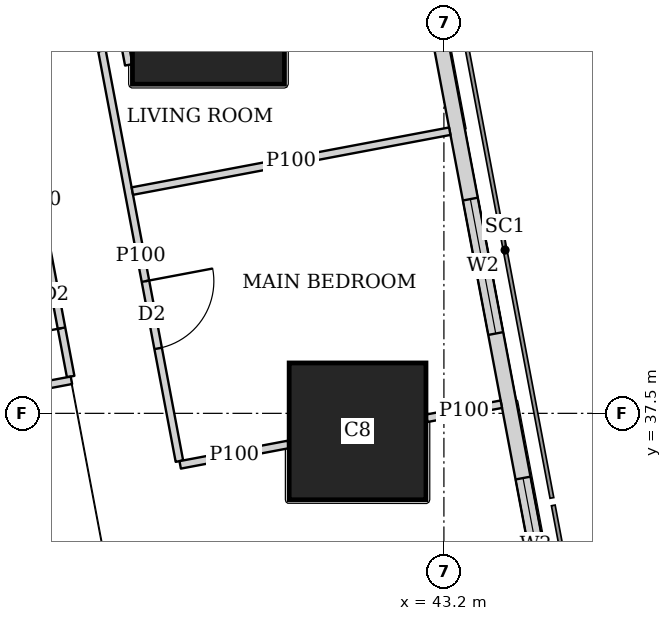
"""IFC4 building model, lengths in metres.
Left out: names, types, materials, properties, quantities, classifications, styles, units other than length and angle.
Written with IfcOpenShell. Run it as: python <this file> out.ifc"""

import sys

from ifc_helpers import new_model, si_unit, direction, frame, frame_2d, origin, origin_2d, place, context, subcontext, project, spatial, rectangle, extrude, element, fill, save


model = new_model("IFC4")
c1 = context("Model", 3, precision=1e-05, world=origin(), true_north=direction((0.0, 1.0)))
c2 = subcontext(c1, "Body", "Model", "MODEL_VIEW")
j1 = project(units=[si_unit("LENGTHUNIT", "METRE"), si_unit("PLANEANGLEUNIT", "RADIAN")], contexts=[c1])
p1 = place(None, origin())
s1 = spatial("IfcSite", under=j1, at=p1, CompositionType="ELEMENT")
p2 = place(p1, origin())
s2 = spatial("IfcBuilding", under=s1, at=p2, CompositionType="ELEMENT")
p3 = place(p2, frame((0.0, 0.0, 180.8)))
s3 = spatial("IfcBuildingStorey", under=s2, at=p3, CompositionType="ELEMENT", Elevation=180.8)
p4 = place(p3, frame((42.064, 37.263, 0.0), z_axis=(0.0, 0.0, 1.0), x_axis=(1.0, 0.0, 0.0)))
e1 = element("IfcColumn", 1, at=p4, inside=s3, PredefinedType="COLUMN", context=c2, shape_type="SweptSolid", body=[
    extrude(rectangle(XDim=1.8, YDim=1.8, at=origin_2d()), origin(), (0.0, 0.0, 1.0), 3.75),
])
p5 = place(p3, frame((40.102, 42.83, 0.0), z_axis=(0.0, 0.0, 1.0), x_axis=(1.0, 0.0, 0.0)))
e2 = element("IfcColumn", 2, at=p5, inside=s3, PredefinedType="COLUMN", context=c2, shape_type="SweptSolid", body=[
    extrude(rectangle(XDim=2.0, YDim=2.0, at=origin_2d()), origin(), (0.0, 0.0, 1.0), 3.75),
])
p6 = place(p3, frame((50.653, 2.703, 0.0), z_axis=(0.0, 0.0, 1.0), x_axis=(-0.185612026696, 0.982623109613, 0.0)))
e3 = element("IfcWall", 3, at=p6, inside=s3, PredefinedType="SOLIDWALL", context=c2, shape_type="SweptSolid", body=[
    extrude(rectangle(XDim=41.393, YDim=0.2, at=frame_2d((20.697, 0.0))), origin(), (0.0, 0.0, 1.0), 3.5),
])
p7 = place(p6, frame((1.633, 0.0, 0.9)))
e4 = element("IfcOpeningElement", 4, at=p7, cuts=e3, PredefinedType="OPENING", context=c2, shape_type="SweptSolid", body=[
    extrude(rectangle(XDim=1.8, YDim=1.5, at=frame_2d((0.9, 0.75))), frame((0.0, 0.11, 0.0), z_axis=(0.0, -1.0, 0.0), x_axis=(1.0, 0.0, 0.0)), (0.0, 0.0, 1.0), 0.22),
])
p8 = place(p6, frame((6.032, 0.0, 0.9)))
e5 = element("IfcOpeningElement", 5, at=p8, cuts=e3, PredefinedType="OPENING", context=c2, shape_type="SweptSolid", body=[
    extrude(rectangle(XDim=1.8, YDim=1.5, at=frame_2d((0.9, 0.75))), frame((0.0, 0.11, 0.0), z_axis=(0.0, -1.0, 0.0), x_axis=(1.0, 0.0, 0.0)), (0.0, 0.0, 1.0), 0.22),
])
p9 = place(p6, frame((9.848, 0.0, 0.9)))
e6 = element("IfcOpeningElement", 6, at=p9, cuts=e3, PredefinedType="OPENING", context=c2, shape_type="SweptSolid", body=[
    extrude(rectangle(XDim=1.8, YDim=1.5, at=frame_2d((0.9, 0.75))), frame((0.0, 0.11, 0.0), z_axis=(0.0, -1.0, 0.0), x_axis=(1.0, 0.0, 0.0)), (0.0, 0.0, 1.0), 0.22),
])
p10 = place(p6, frame((13.664, 0.0, 0.9)))
e7 = element("IfcOpeningElement", 7, at=p10, cuts=e3, PredefinedType="OPENING", context=c2, shape_type="SweptSolid", body=[
    extrude(rectangle(XDim=1.8, YDim=1.5, at=frame_2d((0.9, 0.75))), frame((0.0, 0.11, 0.0), z_axis=(0.0, -1.0, 0.0), x_axis=(1.0, 0.0, 0.0)), (0.0, 0.0, 1.0), 0.22),
])
p11 = place(p6, frame((17.481, 0.0, 0.9)))
e8 = element("IfcOpeningElement", 8, at=p11, cuts=e3, PredefinedType="OPENING", context=c2, shape_type="SweptSolid", body=[
    extrude(rectangle(XDim=1.8, YDim=1.5, at=frame_2d((0.9, 0.75))), frame((0.0, 0.11, 0.0), z_axis=(0.0, -1.0, 0.0), x_axis=(1.0, 0.0, 0.0)), (0.0, 0.0, 1.0), 0.22),
])
p12 = place(p6, frame((21.297, 0.0, 0.9)))
e9 = element("IfcOpeningElement", 9, at=p12, cuts=e3, PredefinedType="OPENING", context=c2, shape_type="SweptSolid", body=[
    extrude(rectangle(XDim=1.8, YDim=1.5, at=frame_2d((0.9, 0.75))), frame((0.0, 0.11, 0.0), z_axis=(0.0, -1.0, 0.0), x_axis=(1.0, 0.0, 0.0)), (0.0, 0.0, 1.0), 0.22),
])
p13 = place(p6, frame((25.113, 0.0, 0.9)))
e10 = element("IfcOpeningElement", 10, at=p13, cuts=e3, PredefinedType="OPENING", context=c2, shape_type="SweptSolid", body=[
    extrude(rectangle(XDim=1.8, YDim=1.5, at=frame_2d((0.9, 0.75))), frame((0.0, 0.11, 0.0), z_axis=(0.0, -1.0, 0.0), x_axis=(1.0, 0.0, 0.0)), (0.0, 0.0, 1.0), 0.22),
])
p14 = place(p6, frame((28.93, 0.0, 0.9)))
e11 = element("IfcOpeningElement", 11, at=p14, cuts=e3, PredefinedType="OPENING", context=c2, shape_type="SweptSolid", body=[
    extrude(rectangle(XDim=1.8, YDim=1.5, at=frame_2d((0.9, 0.75))), frame((0.0, 0.11, 0.0), z_axis=(0.0, -1.0, 0.0), x_axis=(1.0, 0.0, 0.0)), (0.0, 0.0, 1.0), 0.22),
])
p15 = place(p6, frame((32.746, 0.0, 0.9)))
e12 = element("IfcOpeningElement", 12, at=p15, cuts=e3, PredefinedType="OPENING", context=c2, shape_type="SweptSolid", body=[
    extrude(rectangle(XDim=1.8, YDim=1.5, at=frame_2d((0.9, 0.75))), frame((0.0, 0.11, 0.0), z_axis=(0.0, -1.0, 0.0), x_axis=(1.0, 0.0, 0.0)), (0.0, 0.0, 1.0), 0.22),
])
p16 = place(p6, frame((36.481, 0.0, 0.9)))
e13 = element("IfcOpeningElement", 13, at=p16, cuts=e3, PredefinedType="OPENING", context=c2, shape_type="SweptSolid", body=[
    extrude(rectangle(XDim=1.8, YDim=1.5, at=frame_2d((0.9, 0.75))), frame((0.0, 0.11, 0.0), z_axis=(0.0, -1.0, 0.0), x_axis=(1.0, 0.0, 0.0)), (0.0, 0.0, 1.0), 0.22),
])
p17 = place(p3, frame((33.623, 43.022, 0.0), z_axis=(0.0, 0.0, 1.0), x_axis=(0.185596841028, -0.98262597798, 0.0)))
e14 = element("IfcWall", 14, at=p17, inside=s3, PredefinedType="SOLIDWALL", context=c2, shape_type="SweptSolid", body=[
    extrude(rectangle(XDim=41.66, YDim=0.15, at=frame_2d((20.83, 0.0))), origin(), (0.0, 0.0, 1.0), 2.5),
])
p18 = place(p17, frame((8.034, 0.0, 0.0)))
e15 = element("IfcOpeningElement", 15, at=p18, cuts=e14, PredefinedType="OPENING", context=c2, shape_type="SweptSolid", body=[
    extrude(rectangle(XDim=1.0, YDim=2.1, at=frame_2d((0.5, 1.05))), frame((0.0, 0.085, 0.0), z_axis=(0.0, -1.0, 0.0), x_axis=(1.0, 0.0, 0.0)), (0.0, 0.0, 1.0), 0.17),
])
p19 = place(p17, frame((12.611, 0.0, 0.0)))
e16 = element("IfcOpeningElement", 16, at=p19, cuts=e14, PredefinedType="OPENING", context=c2, shape_type="SweptSolid", body=[
    extrude(rectangle(XDim=1.0, YDim=2.1, at=frame_2d((0.5, 1.05))), frame((0.0, 0.085, 0.0), z_axis=(0.0, -1.0, 0.0), x_axis=(1.0, 0.0, 0.0)), (0.0, 0.0, 1.0), 0.17),
])
p20 = place(p17, frame((20.242, 0.0, 0.0)))
e17 = element("IfcOpeningElement", 17, at=p20, cuts=e14, PredefinedType="OPENING", context=c2, shape_type="SweptSolid", body=[
    extrude(rectangle(XDim=1.0, YDim=2.1, at=frame_2d((0.5, 1.05))), frame((0.0, 0.085, 0.0), z_axis=(0.0, -1.0, 0.0), x_axis=(1.0, 0.0, 0.0)), (0.0, 0.0, 1.0), 0.17),
])
p21 = place(p17, frame((31.206, 0.0, 0.0)))
e18 = element("IfcOpeningElement", 18, at=p21, cuts=e14, PredefinedType="OPENING", context=c2, shape_type="SweptSolid", body=[
    extrude(rectangle(XDim=1.0, YDim=2.1, at=frame_2d((0.5, 1.05))), frame((0.0, 0.085, 0.0), z_axis=(0.0, -1.0, 0.0), x_axis=(1.0, 0.0, 0.0)), (0.0, 0.0, 1.0), 0.17),
])
p22 = place(p3, frame((39.054, 42.085, 0.0), z_axis=(0.0, 0.0, 1.0), x_axis=(-0.185791584218, 0.982589175207, 0.0)))
e19 = element("IfcWall", 19, at=p22, inside=s3, PredefinedType="PARTITIONING", context=c2, shape_type="SweptSolid", body=[
    extrude(rectangle(XDim=3.628, YDim=0.1, at=frame_2d((1.814, 0.0))), origin(), (0.0, 0.0, 1.0), 2.1),
])
p23 = place(p3, frame((38.701, 42.27, 0.0), z_axis=(0.0, 0.0, 1.0), x_axis=(0.185474244877, -0.982649125826, 0.0)))
e20 = element("IfcWall", 20, at=p23, inside=s3, PredefinedType="PARTITIONING", context=c2, shape_type="SweptSolid", body=[
    extrude(rectangle(XDim=5.494, YDim=0.1, at=frame_2d((2.747, 0.0))), origin(), (0.0, 0.0, 1.0), 3.5),
])
p24 = place(p23, frame((3.085, 0.0, 0.0)))
e21 = element("IfcOpeningElement", 21, at=p24, cuts=e20, PredefinedType="OPENING", context=c2, shape_type="SweptSolid", body=[
    extrude(rectangle(XDim=0.9, YDim=2.1, at=frame_2d((0.45, 1.05))), frame((0.0, 0.06, 0.0), z_axis=(0.0, -1.0, 0.0), x_axis=(1.0, 0.0, 0.0)), (0.0, 0.0, 1.0), 0.12),
])
p25 = place(p3, frame((37.41, 42.639, 0.0), z_axis=(0.0, 0.0, 1.0), x_axis=(0.185579683022, -0.982629218601, 0.0)))
e22 = element("IfcWall", 22, at=p25, inside=s3, PredefinedType="PARTITIONING", context=c2, shape_type="SweptSolid", body=[
    extrude(rectangle(XDim=4.737, YDim=0.1, at=frame_2d((2.369, 0.0))), origin(), (0.0, 0.0, 1.0), 3.5),
])
p26 = place(p25, frame((3.189, 0.0, 0.0)))
e23 = element("IfcOpeningElement", 23, at=p26, cuts=e22, PredefinedType="OPENING", context=c2, shape_type="SweptSolid", body=[
    extrude(rectangle(XDim=0.9, YDim=2.1, at=frame_2d((0.45, 1.05))), frame((0.0, 0.06, 0.0), z_axis=(0.0, -1.0, 0.0), x_axis=(1.0, 0.0, 0.0)), (0.0, 0.0, 1.0), 0.12),
])
p27 = place(p25, frame((1.191, 0.0, 0.0)))
e24 = element("IfcOpeningElement", 24, at=p27, cuts=e22, PredefinedType="OPENING", context=c2, shape_type="SweptSolid", body=[
    extrude(rectangle(XDim=0.9, YDim=2.1, at=frame_2d((0.45, 1.05))), frame((0.0, 0.06, 0.0), z_axis=(0.0, -1.0, 0.0), x_axis=(1.0, 0.0, 0.0)), (0.0, 0.0, 1.0), 0.12),
])
p28 = place(p3, frame((43.277, 41.212, 0.0), z_axis=(0.0, 0.0, 1.0), x_axis=(-0.982665405803, -0.185387972203, 0.0)))
e25 = element("IfcWall", 25, at=p28, inside=s3, PredefinedType="PARTITIONING", context=c2, shape_type="SweptSolid", body=[
    extrude(rectangle(XDim=4.25, YDim=0.1, at=frame_2d((2.125, 0.0))), origin(), (0.0, 0.0, 1.0), 2.1),
])
p29 = place(p3, frame((43.955, 37.62, 0.0), z_axis=(0.0, 0.0, 1.0), x_axis=(-0.982666697719, -0.185381124159, 0.0)))
e26 = element("IfcWall", 26, at=p29, inside=s3, PredefinedType="PARTITIONING", context=c2, shape_type="SweptSolid", body=[
    extrude(rectangle(XDim=0.998, YDim=0.1, at=frame_2d((0.499, 0.0))), origin(), (0.0, 0.0, 1.0), 3.5),
])
p30 = place(p3, frame((41.154, 37.091, 0.0), z_axis=(0.0, 0.0, 1.0), x_axis=(-0.982617614942, -0.185641112921, 0.0)))
e27 = element("IfcWall", 27, at=p30, inside=s3, PredefinedType="PARTITIONING", context=c2, shape_type="SweptSolid", body=[
    extrude(rectangle(XDim=1.449, YDim=0.1, at=frame_2d((0.725, 0.0))), origin(), (0.0, 0.0, 1.0), 3.5),
])
p31 = place(p3, frame((38.299, 37.935, 0.0), z_axis=(0.0, 0.0, 1.0), x_axis=(-0.98258870752, -0.18579405764, 0.0)))
e28 = element("IfcWall", 28, at=p31, inside=s3, PredefinedType="PARTITIONING", context=c2, shape_type="SweptSolid", body=[
    extrude(rectangle(XDim=1.566, YDim=0.1, at=frame_2d((0.783, 0.0))), origin(), (0.0, 0.0, 1.0), 3.5),
])
p32 = place(p15, origin())
e29 = element("IfcWindow", 29, at=p32, inside=s3, PartitioningType="SINGLE_PANEL", PredefinedType="WINDOW", context=c2, shape_type="SweptSolid", body=[
    extrude(rectangle(XDim=1.8, YDim=1.5, at=frame_2d((0.9, 0.75))), frame((0.0, 0.03, 0.0), z_axis=(0.0, -1.0, 0.0), x_axis=(1.0, 0.0, 0.0)), (0.0, 0.0, 1.0), 0.06),
])
fill(e12, e29)
p33 = place(p16, origin())
e30 = element("IfcWindow", 30, at=p33, inside=s3, PartitioningType="SINGLE_PANEL", PredefinedType="WINDOW", context=c2, shape_type="SweptSolid", body=[
    extrude(rectangle(XDim=1.8, YDim=1.5, at=frame_2d((0.9, 0.75))), frame((0.0, 0.03, 0.0), z_axis=(0.0, -1.0, 0.0), x_axis=(1.0, 0.0, 0.0)), (0.0, 0.0, 1.0), 0.06),
])
fill(e13, e30)
p34 = place(p24, origin())
e31 = element("IfcDoor", 31, at=p34, inside=s3, OperationType="SINGLE_SWING_LEFT", PredefinedType="DOOR", context=c2, shape_type="SweptSolid", body=[
    extrude(rectangle(XDim=0.9, YDim=2.1, at=frame_2d((0.45, 1.05))), frame((0.0, 0.025, 0.0), z_axis=(0.0, -1.0, 0.0), x_axis=(1.0, 0.0, 0.0)), (0.0, 0.0, 1.0), 0.05),
])
fill(e21, e31)
p35 = place(p26, origin())
e32 = element("IfcDoor", 32, at=p35, inside=s3, OperationType="SINGLE_SWING_LEFT", PredefinedType="DOOR", context=c2, shape_type="SweptSolid", body=[
    extrude(rectangle(XDim=0.9, YDim=2.1, at=frame_2d((0.45, 1.05))), frame((0.0, 0.025, 0.0), z_axis=(0.0, -1.0, 0.0), x_axis=(1.0, 0.0, 0.0)), (0.0, 0.0, 1.0), 0.05),
])
fill(e23, e32)
save(model, sys.argv[1])
